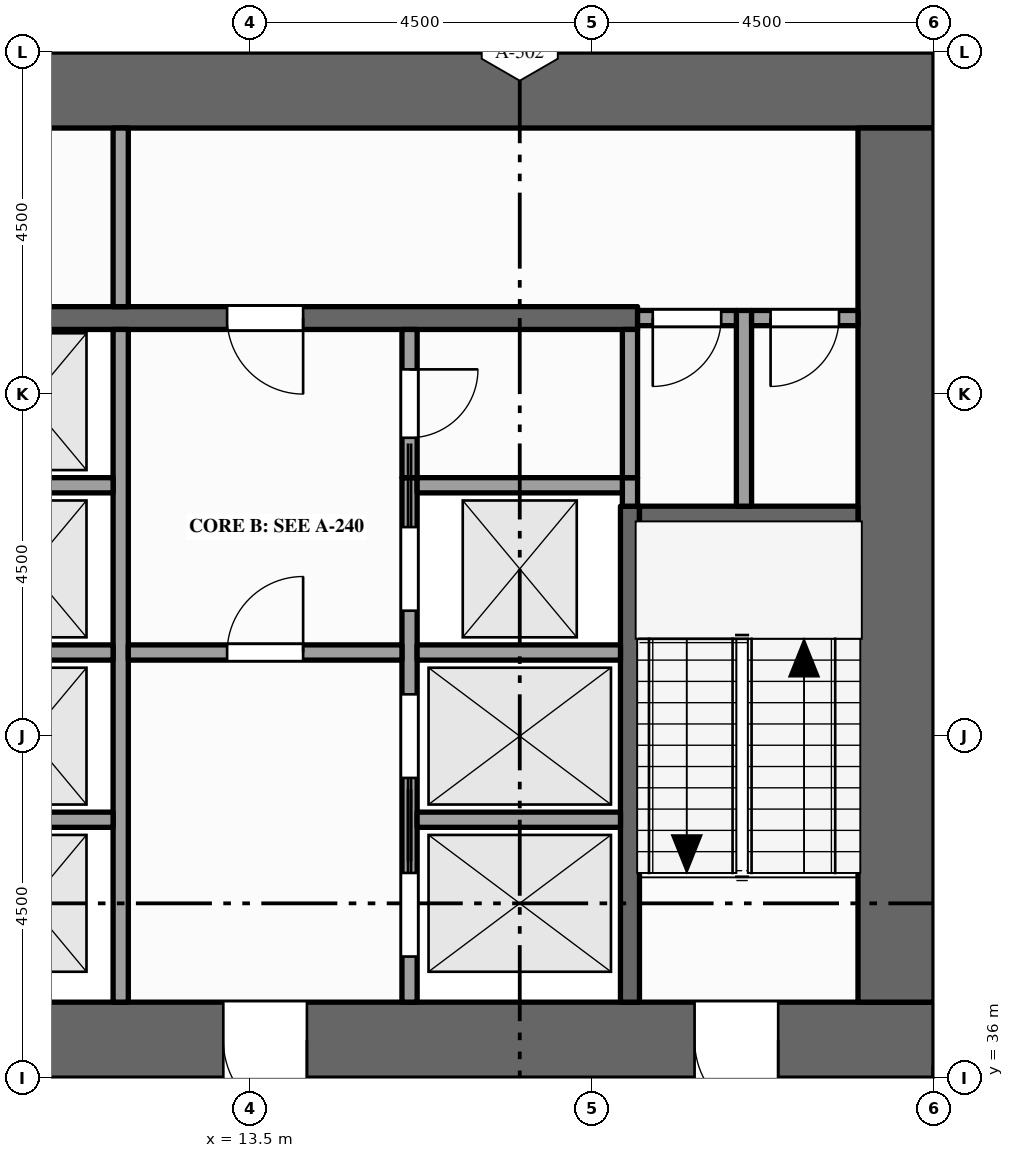
"""IFC4 building model, lengths in metres.
Left out: names, types, materials, properties, quantities, classifications, styles, units other than length and angle.
Written with IfcOpenShell. Run it as: python <this file> out.ifc"""

import sys

from ifc_helpers import new_model, si_unit, direction, frame, frame_2d, origin, place, context, subcontext, project, spatial, rectangle, extrude, element, fill, save


model = new_model("IFC4")
c1 = context("Model", 3, precision=1e-05, world=origin(), true_north=direction((0.0, 1.0)))
c2 = subcontext(c1, "Body", "Model", "MODEL_VIEW")
j1 = project(units=[si_unit("LENGTHUNIT", "METRE"), si_unit("PLANEANGLEUNIT", "RADIAN")], contexts=[c1])
p1 = place(None, origin())
s1 = spatial("IfcSite", under=j1, at=p1, CompositionType="ELEMENT")
p2 = place(p1, origin())
s2 = spatial("IfcBuilding", under=s1, at=p2, CompositionType="ELEMENT")
p3 = place(p2, frame((0.0, 0.0, 223.0)))
s3 = spatial("IfcBuildingStorey", under=s2, at=p3, CompositionType="ELEMENT", Elevation=223.0)
p4 = place(p3, frame((0.0, 36.5, -0.15), z_axis=(0.0, 0.0, 1.0), x_axis=(1.0, 0.0, 0.0)))
e1 = element("IfcWall", 1, at=p4, inside=s3, PredefinedType="SHEAR", context=c2, shape_type="SweptSolid", body=[
    extrude(rectangle(XDim=22.5, YDim=1.0, at=frame_2d((11.25, 0.0))), origin(), (0.0, 0.0, 1.0), 4.0),
])
p5 = place(p4, frame((7.1, 0.0, 0.15)))
e2 = element("IfcOpeningElement", 2, at=p5, cuts=e1, PredefinedType="OPENING", context=c2, shape_type="SweptSolid", body=[
    extrude(rectangle(XDim=1.8, YDim=2.1, at=frame_2d((0.9, 1.05))), frame((0.0, 0.51, 0.0), z_axis=(0.0, -1.0, 0.0), x_axis=(1.0, 0.0, 0.0)), (0.0, 0.0, 1.0), 1.02),
])
p6 = place(p4, frame((13.15, 0.0, 0.15)))
e3 = element("IfcOpeningElement", 3, at=p6, cuts=e1, PredefinedType="OPENING", context=c2, shape_type="SweptSolid", body=[
    extrude(rectangle(XDim=1.1, YDim=2.1, at=frame_2d((0.55, 1.05))), frame((0.0, 0.51, 0.0), z_axis=(0.0, -1.0, 0.0), x_axis=(1.0, 0.0, 0.0)), (0.0, 0.0, 1.0), 1.02),
])
p7 = place(p4, frame((2.15, 0.0, 0.15)))
e4 = element("IfcOpeningElement", 4, at=p7, cuts=e1, PredefinedType="OPENING", context=c2, shape_type="SweptSolid", body=[
    extrude(rectangle(XDim=1.1, YDim=2.1, at=frame_2d((0.55, 1.05))), frame((0.0, 0.51, 0.0), z_axis=(0.0, -1.0, 0.0), x_axis=(1.0, 0.0, 0.0)), (0.0, 0.0, 1.0), 1.02),
])
p8 = place(p4, frame((19.35, 0.0, 0.15)))
e5 = element("IfcOpeningElement", 5, at=p8, cuts=e1, PredefinedType="OPENING", context=c2, shape_type="SweptSolid", body=[
    extrude(rectangle(XDim=1.1, YDim=2.1, at=frame_2d((0.55, 1.05))), frame((0.0, 0.51, 0.0), z_axis=(0.0, -1.0, 0.0), x_axis=(1.0, 0.0, 0.0)), (0.0, 0.0, 1.0), 1.02),
])
p9 = place(p3, frame((0.0, 49.0, -0.15), z_axis=(0.0, 0.0, 1.0), x_axis=(1.0, 0.0, 0.0)))
e6 = element("IfcWall", 6, at=p9, inside=s3, PredefinedType="SHEAR", context=c2, shape_type="SweptSolid", body=[
    extrude(rectangle(XDim=22.5, YDim=1.0, at=frame_2d((11.25, 0.0))), origin(), (0.0, 0.0, 1.0), 4.0),
])
p10 = place(p3, frame((22.0, 37.0, -0.15), z_axis=(0.0, 0.0, 1.0), x_axis=(0.0, 1.0, 0.0)))
e7 = element("IfcWall", 7, at=p10, inside=s3, PredefinedType="SHEAR", context=c2, shape_type="SweptSolid", body=[
    extrude(rectangle(XDim=11.5, YDim=1.0, at=frame_2d((5.75, 0.0))), origin(), (0.0, 0.0, 1.0), 4.0),
])
p11 = place(p3, frame((11.8, 37.0, 0.0), z_axis=(0.0, 0.0, 1.0), x_axis=(0.0, 1.0, 0.0)))
e8 = element("IfcWall", 8, at=p11, inside=s3, PredefinedType="SOLIDWALL", context=c2, shape_type="SweptSolid", body=[
    extrude(rectangle(XDim=8.85, YDim=0.2, at=frame_2d((4.425, 0.0))), origin(), (0.0, 0.0, 1.0), 3.85),
])
p12 = place(p3, frame((11.8, 46.15, 0.0), z_axis=(0.0, 0.0, 1.0), x_axis=(0.0, 1.0, 0.0)))
e9 = element("IfcWall", 9, at=p12, inside=s3, PredefinedType="PARTITIONING", context=c2, shape_type="SweptSolid", body=[
    extrude(rectangle(XDim=2.35, YDim=0.2, at=frame_2d((1.175, 0.0))), origin(), (0.0, 0.0, 1.0), 3.85),
])
p13 = place(p3, frame((15.6, 37.0, 0.0), z_axis=(0.0, 0.0, 1.0), x_axis=(0.0, 1.0, 0.0)))
e10 = element("IfcWall", 10, at=p13, inside=s3, PredefinedType="SOLIDWALL", context=c2, shape_type="SweptSolid", body=[
    extrude(rectangle(XDim=6.9, YDim=0.2, at=frame_2d((3.45, 0.0))), origin(), (0.0, 0.0, 1.0), 3.85),
])
p14 = place(p13, frame((0.6, 0.0, 0.012)))
e11 = element("IfcOpeningElement", 11, at=p14, cuts=e10, PredefinedType="OPENING", context=c2, shape_type="SweptSolid", body=[
    extrude(rectangle(XDim=1.1, YDim=2.1, at=frame_2d((0.55, 1.05))), frame((0.0, 0.11, 0.0), z_axis=(0.0, -1.0, 0.0), x_axis=(1.0, 0.0, 0.0)), (0.0, 0.0, 1.0), 0.22),
])
p15 = place(p13, frame((2.95, 0.0, 0.012)))
e12 = element("IfcOpeningElement", 12, at=p15, cuts=e10, PredefinedType="OPENING", context=c2, shape_type="SweptSolid", body=[
    extrude(rectangle(XDim=1.1, YDim=2.1, at=frame_2d((0.55, 1.05))), frame((0.0, 0.11, 0.0), z_axis=(0.0, -1.0, 0.0), x_axis=(1.0, 0.0, 0.0)), (0.0, 0.0, 1.0), 0.22),
])
p16 = place(p13, frame((5.15, 0.0, 0.012)))
e13 = element("IfcOpeningElement", 13, at=p16, cuts=e10, PredefinedType="OPENING", context=c2, shape_type="SweptSolid", body=[
    extrude(rectangle(XDim=1.1, YDim=2.1, at=frame_2d((0.55, 1.05))), frame((0.0, 0.11, 0.0), z_axis=(0.0, -1.0, 0.0), x_axis=(1.0, 0.0, 0.0)), (0.0, 0.0, 1.0), 0.22),
])
p17 = place(p3, frame((15.6, 43.9, 0.0), z_axis=(0.0, 0.0, 1.0), x_axis=(0.0, 1.0, 0.0)))
e14 = element("IfcWall", 14, at=p17, inside=s3, PredefinedType="PARTITIONING", context=c2, shape_type="SweptSolid", body=[
    extrude(rectangle(XDim=1.95, YDim=0.2, at=frame_2d((0.975, 0.0))), origin(), (0.0, 0.0, 1.0), 3.85),
])
p18 = place(p17, frame((0.525, 0.0, 0.0)))
e15 = element("IfcOpeningElement", 15, at=p18, cuts=e14, PredefinedType="OPENING", context=c2, shape_type="SweptSolid", body=[
    extrude(rectangle(XDim=0.9, YDim=2.1, at=frame_2d((0.45, 1.05))), frame((0.0, 0.11, 0.0), z_axis=(0.0, -1.0, 0.0), x_axis=(1.0, 0.0, 0.0)), (0.0, 0.0, 1.0), 0.22),
])
p19 = place(p3, frame((18.5, 37.0, 0.0), z_axis=(0.0, 0.0, 1.0), x_axis=(0.0, 1.0, 0.0)))
e16 = element("IfcWall", 16, at=p19, inside=s3, PredefinedType="SHEAR", context=c2, shape_type="SweptSolid", body=[
    extrude(rectangle(XDim=6.525, YDim=0.25, at=frame_2d((3.262, 0.0))), origin(), (0.0, 0.0, 1.0), 3.85),
])
p20 = place(p3, frame((18.5, 43.525, 0.0), z_axis=(0.0, 0.0, 1.0), x_axis=(0.0, 1.0, 0.0)))
e17 = element("IfcWall", 17, at=p20, inside=s3, PredefinedType="SOLIDWALL", context=c2, shape_type="SweptSolid", body=[
    extrude(rectangle(XDim=0.375, YDim=0.2, at=frame_2d((0.188, 0.0))), origin(), (0.0, 0.0, 1.0), 3.85),
])
p21 = place(p3, frame((18.5, 43.9, 0.0), z_axis=(0.0, 0.0, 1.0), x_axis=(0.0, 1.0, 0.0)))
e18 = element("IfcWall", 18, at=p21, inside=s3, PredefinedType="PARTITIONING", context=c2, shape_type="SweptSolid", body=[
    extrude(rectangle(XDim=1.95, YDim=0.2, at=frame_2d((0.975, 0.0))), origin(), (0.0, 0.0, 1.0), 3.85),
])
p22 = place(p3, frame((20.0, 43.525, 0.0), z_axis=(0.0, 0.0, 1.0), x_axis=(0.0, 1.0, 0.0)))
e19 = element("IfcWall", 19, at=p22, inside=s3, PredefinedType="PARTITIONING", context=c2, shape_type="SweptSolid", body=[
    extrude(rectangle(XDim=2.575, YDim=0.2, at=frame_2d((1.288, 0.0))), origin(), (0.0, 0.0, 1.0), 3.85),
])
p23 = place(p3, frame((9.5, 39.4, 0.0), z_axis=(0.0, 0.0, 1.0), x_axis=(1.0, 0.0, 0.0)))
e20 = element("IfcWall", 20, at=p23, inside=s3, PredefinedType="SOLIDWALL", context=c2, shape_type="SweptSolid", body=[
    extrude(rectangle(XDim=2.2, YDim=0.2, at=frame_2d((1.1, 0.0))), origin(), (0.0, 0.0, 1.0), 3.85),
])
p24 = place(p3, frame((15.7, 39.4, 0.0), z_axis=(0.0, 0.0, 1.0), x_axis=(1.0, 0.0, 0.0)))
e21 = element("IfcWall", 21, at=p24, inside=s3, PredefinedType="SOLIDWALL", context=c2, shape_type="SweptSolid", body=[
    extrude(rectangle(XDim=2.675, YDim=0.2, at=frame_2d((1.337, 0.0))), origin(), (0.0, 0.0, 1.0), 3.85),
])
p25 = place(p3, frame((9.5, 41.6, 0.0), z_axis=(0.0, 0.0, 1.0), x_axis=(1.0, 0.0, 0.0)))
e22 = element("IfcWall", 22, at=p25, inside=s3, PredefinedType="SOLIDWALL", context=c2, shape_type="SweptSolid", body=[
    extrude(rectangle(XDim=2.2, YDim=0.2, at=frame_2d((1.1, 0.0))), origin(), (0.0, 0.0, 1.0), 3.85),
])
p26 = place(p3, frame((11.9, 41.6, 0.0), z_axis=(0.0, 0.0, 1.0), x_axis=(1.0, 0.0, 0.0)))
e23 = element("IfcWall", 23, at=p26, inside=s3, PredefinedType="PARTITIONING", context=c2, shape_type="SweptSolid", body=[
    extrude(rectangle(XDim=3.6, YDim=0.2, at=frame_2d((1.8, 0.0))), origin(), (0.0, 0.0, 1.0), 3.85),
])
p27 = place(p26, frame((1.3, 0.0, 0.0)))
e24 = element("IfcOpeningElement", 24, at=p27, cuts=e23, PredefinedType="OPENING", context=c2, shape_type="SweptSolid", body=[
    extrude(rectangle(XDim=1.0, YDim=2.1, at=frame_2d((0.5, 1.05))), frame((0.0, 0.11, 0.0), z_axis=(0.0, -1.0, 0.0), x_axis=(1.0, 0.0, 0.0)), (0.0, 0.0, 1.0), 0.22),
])
p28 = place(p3, frame((15.7, 41.6, 0.0), z_axis=(0.0, 0.0, 1.0), x_axis=(1.0, 0.0, 0.0)))
e25 = element("IfcWall", 25, at=p28, inside=s3, PredefinedType="SOLIDWALL", context=c2, shape_type="SweptSolid", body=[
    extrude(rectangle(XDim=2.675, YDim=0.2, at=frame_2d((1.337, 0.0))), origin(), (0.0, 0.0, 1.0), 3.85),
])
p29 = place(p3, frame((18.625, 43.4, 0.0), z_axis=(0.0, 0.0, 1.0), x_axis=(1.0, 0.0, 0.0)))
e26 = element("IfcWall", 26, at=p29, inside=s3, PredefinedType="SHEAR", context=c2, shape_type="SweptSolid", body=[
    extrude(rectangle(XDim=2.875, YDim=0.25, at=frame_2d((1.438, 0.0))), origin(), (0.0, 0.0, 1.0), 3.85),
])
p30 = place(p3, frame((9.5, 43.8, 0.0), z_axis=(0.0, 0.0, 1.0), x_axis=(1.0, 0.0, 0.0)))
e27 = element("IfcWall", 27, at=p30, inside=s3, PredefinedType="SOLIDWALL", context=c2, shape_type="SweptSolid", body=[
    extrude(rectangle(XDim=2.2, YDim=0.2, at=frame_2d((1.1, 0.0))), origin(), (0.0, 0.0, 1.0), 3.85),
])
p31 = place(p3, frame((15.7, 43.8, 0.0), z_axis=(0.0, 0.0, 1.0), x_axis=(1.0, 0.0, 0.0)))
e28 = element("IfcWall", 28, at=p31, inside=s3, PredefinedType="SOLIDWALL", context=c2, shape_type="SweptSolid", body=[
    extrude(rectangle(XDim=2.7, YDim=0.2, at=frame_2d((1.35, 0.0))), origin(), (0.0, 0.0, 1.0), 3.85),
])
p32 = place(p3, frame((4.1, 46.0, 0.0), z_axis=(0.0, 0.0, 1.0), x_axis=(1.0, 0.0, 0.0)))
e29 = element("IfcWall", 29, at=p32, inside=s3, PredefinedType="SHEAR", context=c2, shape_type="SweptSolid", body=[
    extrude(rectangle(XDim=14.5, YDim=0.3, at=frame_2d((7.25, 0.0))), origin(), (0.0, 0.0, 1.0), 3.85),
])
p33 = place(p32, frame((3.4, 0.0, 0.0)))
e30 = element("IfcOpeningElement", 30, at=p33, cuts=e29, PredefinedType="OPENING", context=c2, shape_type="SweptSolid", body=[
    extrude(rectangle(XDim=1.0, YDim=2.1, at=frame_2d((0.5, 1.05))), frame((0.0, 0.16, 0.0), z_axis=(0.0, -1.0, 0.0), x_axis=(1.0, 0.0, 0.0)), (0.0, 0.0, 1.0), 0.32),
])
p34 = place(p32, frame((9.1, 0.0, 0.0)))
e31 = element("IfcOpeningElement", 31, at=p34, cuts=e29, PredefinedType="OPENING", context=c2, shape_type="SweptSolid", body=[
    extrude(rectangle(XDim=1.0, YDim=2.1, at=frame_2d((0.5, 1.05))), frame((0.0, 0.16, 0.0), z_axis=(0.0, -1.0, 0.0), x_axis=(1.0, 0.0, 0.0)), (0.0, 0.0, 1.0), 0.32),
])
p35 = place(p3, frame((18.6, 46.0, 0.0), z_axis=(0.0, 0.0, 1.0), x_axis=(1.0, 0.0, 0.0)))
e32 = element("IfcWall", 32, at=p35, inside=s3, PredefinedType="PARTITIONING", context=c2, shape_type="SweptSolid", body=[
    extrude(rectangle(XDim=1.3, YDim=0.2, at=frame_2d((0.65, 0.0))), origin(), (0.0, 0.0, 1.0), 3.85),
])
p36 = place(p35, frame((0.2, 0.0, 0.0)))
e33 = element("IfcOpeningElement", 33, at=p36, cuts=e32, PredefinedType="OPENING", context=c2, shape_type="SweptSolid", body=[
    extrude(rectangle(XDim=0.9, YDim=2.1, at=frame_2d((0.45, 1.05))), frame((0.0, 0.11, 0.0), z_axis=(0.0, -1.0, 0.0), x_axis=(1.0, 0.0, 0.0)), (0.0, 0.0, 1.0), 0.22),
])
p37 = place(p3, frame((20.1, 46.0, 0.0), z_axis=(0.0, 0.0, 1.0), x_axis=(1.0, 0.0, 0.0)))
e34 = element("IfcWall", 34, at=p37, inside=s3, PredefinedType="PARTITIONING", context=c2, shape_type="SweptSolid", body=[
    extrude(rectangle(XDim=1.4, YDim=0.2, at=frame_2d((0.7, 0.0))), origin(), (0.0, 0.0, 1.0), 3.85),
])
p38 = place(p37, frame((0.25, 0.0, 0.0)))
e35 = element("IfcOpeningElement", 35, at=p38, cuts=e34, PredefinedType="OPENING", context=c2, shape_type="SweptSolid", body=[
    extrude(rectangle(XDim=0.9, YDim=2.1, at=frame_2d((0.45, 1.05))), frame((0.0, 0.11, 0.0), z_axis=(0.0, -1.0, 0.0), x_axis=(1.0, 0.0, 0.0)), (0.0, 0.0, 1.0), 0.22),
])
p39 = place(p14, origin())
e36 = element("IfcDoor", 36, at=p39, inside=s3, OperationType="SLIDING_TO_RIGHT", PredefinedType="DOOR", context=c2, shape_type="SweptSolid", body=[
    extrude(rectangle(XDim=1.1, YDim=2.1, at=frame_2d((0.55, 1.05))), frame((0.0, 0.025, 0.0), z_axis=(0.0, -1.0, 0.0), x_axis=(1.0, 0.0, 0.0)), (0.0, 0.0, 1.0), 0.05),
])
fill(e11, e36)
p40 = place(p15, origin())
e37 = element("IfcDoor", 37, at=p40, inside=s3, OperationType="SLIDING_TO_LEFT", PredefinedType="DOOR", context=c2, shape_type="SweptSolid", body=[
    extrude(rectangle(XDim=1.1, YDim=2.1, at=frame_2d((0.55, 1.05))), frame((0.0, 0.025, 0.0), z_axis=(0.0, -1.0, 0.0), x_axis=(1.0, 0.0, 0.0)), (0.0, 0.0, 1.0), 0.05),
])
fill(e12, e37)
p41 = place(p16, origin())
e38 = element("IfcDoor", 38, at=p41, inside=s3, OperationType="SLIDING_TO_RIGHT", PredefinedType="DOOR", context=c2, shape_type="SweptSolid", body=[
    extrude(rectangle(XDim=1.1, YDim=2.1, at=frame_2d((0.55, 1.05))), frame((0.0, 0.025, 0.0), z_axis=(0.0, -1.0, 0.0), x_axis=(1.0, 0.0, 0.0)), (0.0, 0.0, 1.0), 0.05),
])
fill(e13, e38)
p42 = place(p6, origin())
e39 = element("IfcDoor", 39, at=p42, inside=s3, OperationType="SINGLE_SWING_RIGHT", PredefinedType="DOOR", context=c2, shape_type="SweptSolid", body=[
    extrude(rectangle(XDim=1.1, YDim=2.1, at=frame_2d((0.55, 1.05))), frame((0.0, 0.025, 0.0), z_axis=(0.0, -1.0, 0.0), x_axis=(1.0, 0.0, 0.0)), (0.0, 0.0, 1.0), 0.05),
])
fill(e3, e39)
p43 = place(p27, origin())
e40 = element("IfcDoor", 40, at=p43, inside=s3, OperationType="SINGLE_SWING_RIGHT", PredefinedType="DOOR", context=c2, shape_type="SweptSolid", body=[
    extrude(rectangle(XDim=1.0, YDim=2.1, at=frame_2d((0.5, 1.05))), frame((0.0, 0.025, 0.0), z_axis=(0.0, -1.0, 0.0), x_axis=(1.0, 0.0, 0.0)), (0.0, 0.0, 1.0), 0.05),
])
fill(e24, e40)
p44 = place(p34, origin())
e41 = element("IfcDoor", 41, at=p44, inside=s3, OperationType="SINGLE_SWING_RIGHT", PredefinedType="DOOR", context=c2, shape_type="SweptSolid", body=[
    extrude(rectangle(XDim=1.0, YDim=2.1, at=frame_2d((0.5, 1.05))), frame((0.0, 0.025, 0.0), z_axis=(0.0, -1.0, 0.0), x_axis=(1.0, 0.0, 0.0)), (0.0, 0.0, 1.0), 0.05),
])
fill(e31, e41)
p45 = place(p8, origin())
e42 = element("IfcDoor", 42, at=p45, inside=s3, OperationType="SINGLE_SWING_RIGHT", PredefinedType="DOOR", context=c2, shape_type="SweptSolid", body=[
    extrude(rectangle(XDim=1.1, YDim=2.1, at=frame_2d((0.55, 1.05))), frame((0.0, 0.025, 0.0), z_axis=(0.0, -1.0, 0.0), x_axis=(1.0, 0.0, 0.0)), (0.0, 0.0, 1.0), 0.05),
])
fill(e5, e42)
p46 = place(p36, origin())
e43 = element("IfcDoor", 43, at=p46, inside=s3, OperationType="SINGLE_SWING_LEFT", PredefinedType="DOOR", context=c2, shape_type="SweptSolid", body=[
    extrude(rectangle(XDim=0.9, YDim=2.1, at=frame_2d((0.45, 1.05))), frame((0.0, 0.025, 0.0), z_axis=(0.0, -1.0, 0.0), x_axis=(1.0, 0.0, 0.0)), (0.0, 0.0, 1.0), 0.05),
])
fill(e33, e43)
p47 = place(p38, origin())
e44 = element("IfcDoor", 44, at=p47, inside=s3, OperationType="SINGLE_SWING_LEFT", PredefinedType="DOOR", context=c2, shape_type="SweptSolid", body=[
    extrude(rectangle(XDim=0.9, YDim=2.1, at=frame_2d((0.45, 1.05))), frame((0.0, 0.025, 0.0), z_axis=(0.0, -1.0, 0.0), x_axis=(1.0, 0.0, 0.0)), (0.0, 0.0, 1.0), 0.05),
])
fill(e35, e44)
p48 = place(p18, origin())
e45 = element("IfcDoor", 45, at=p48, inside=s3, OperationType="SINGLE_SWING_RIGHT", PredefinedType="DOOR", context=c2, shape_type="SweptSolid", body=[
    extrude(rectangle(XDim=0.9, YDim=2.1, at=frame_2d((0.45, 1.05))), frame((0.0, 0.025, 0.0), z_axis=(0.0, -1.0, 0.0), x_axis=(1.0, 0.0, 0.0)), (0.0, 0.0, 1.0), 0.05),
])
fill(e15, e45)
save(model, sys.argv[1])
